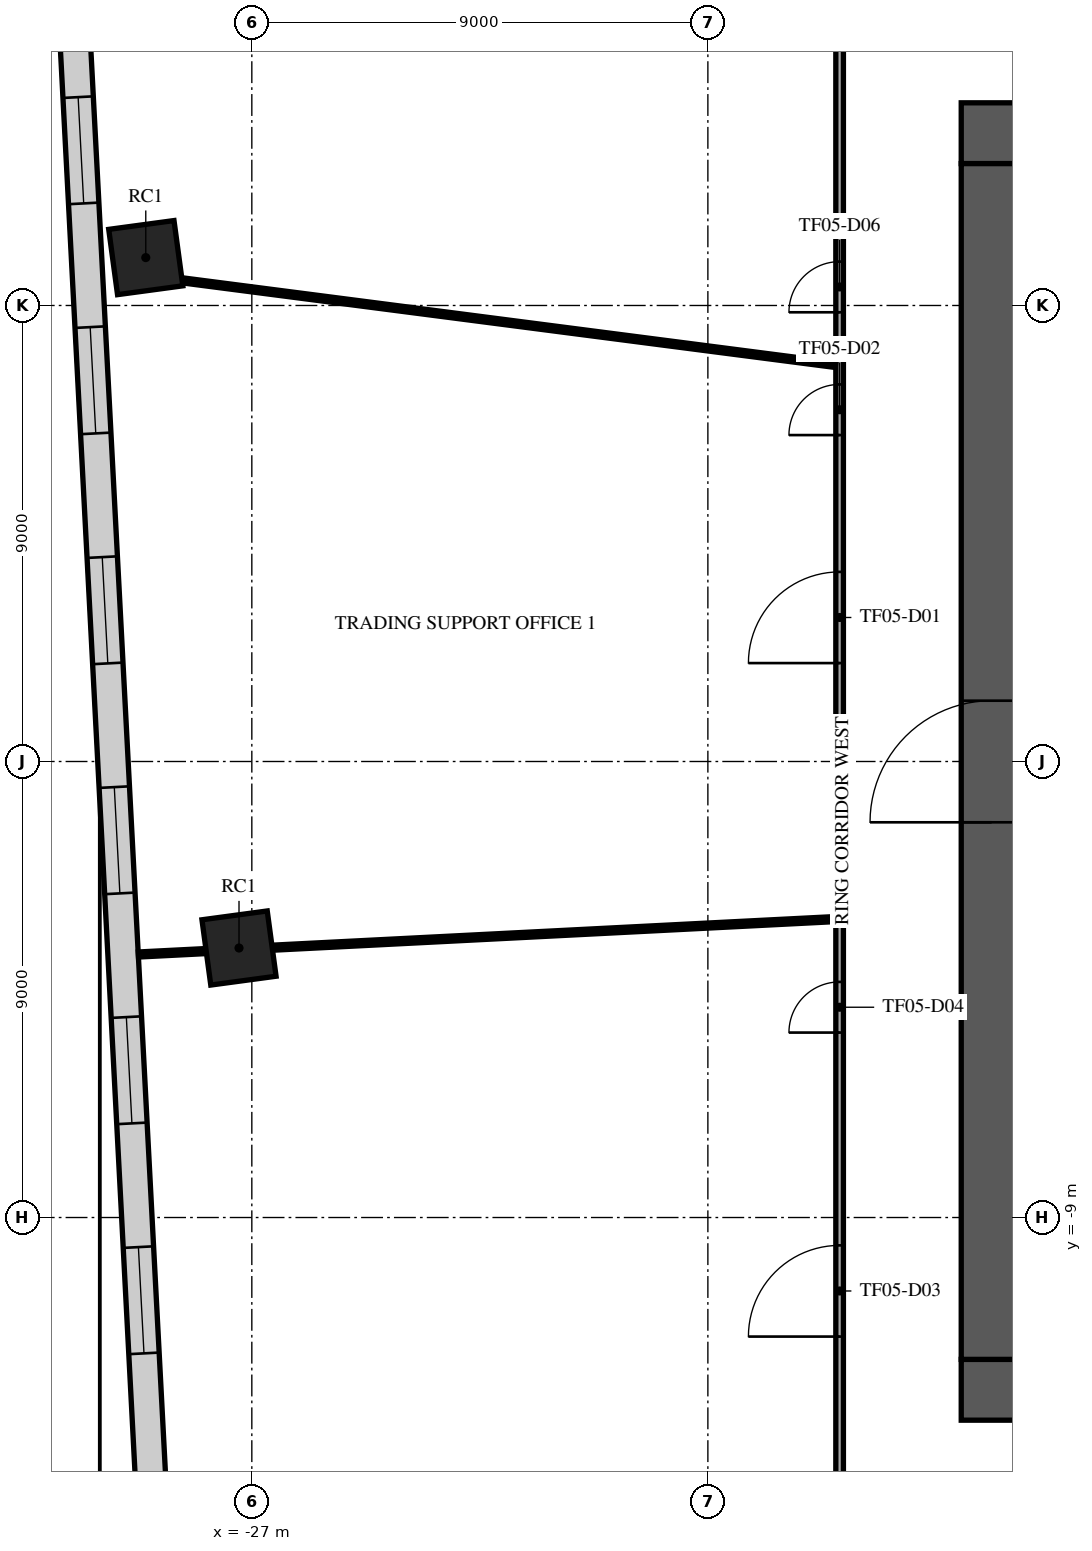
"""IFC4 building model, lengths in metres.
Left out: names, types, materials, properties, quantities, classifications, styles, units other than length and angle.
Written with IfcOpenShell. Run it as: python <this file> out.ifc"""

import sys

from ifc_helpers import new_model, si_unit, direction, frame, frame_2d, origin, origin_2d, place, context, subcontext, project, spatial, rectangle, extrude, element, fill, save


model = new_model("IFC4")
c1 = context("Model", 3, precision=1e-05, world=origin(), true_north=direction((0.0, 1.0)))
c2 = subcontext(c1, "Body", "Model", "MODEL_VIEW")
j1 = project(units=[si_unit("LENGTHUNIT", "METRE"), si_unit("PLANEANGLEUNIT", "RADIAN")], contexts=[c1])
p1 = place(None, origin())
s1 = spatial("IfcSite", under=j1, at=p1, CompositionType="ELEMENT")
p2 = place(p1, origin())
s2 = spatial("IfcBuilding", under=s1, at=p2, CompositionType="ELEMENT")
p3 = place(p2, frame((0.0, 0.0, 22.5)))
s3 = spatial("IfcBuildingStorey", under=s2, at=p3, CompositionType="ELEMENT", Elevation=22.5)
for number, where, z_axis, x_axis in (
    (1, (-29.093, 9.945, 0.0), (0.0, 0.0, 1.0), (0.991, 0.134, 0.0)),
    (2, (-27.253, -3.681, 0.0), (0.0, 0.0, 1.0), (0.991, 0.134, 0.0)),
):
    element("IfcColumn", number, at=place(p3, frame(where, z_axis=z_axis, x_axis=x_axis)), inside=s3, PredefinedType="COLUMN", context=c2, shape_type="SweptSolid", body=[
        extrude(rectangle(XDim=1.3, YDim=1.3, at=origin_2d()), origin(), (0.0, 0.0, 1.0), 4.8),
    ])
p4 = place(p3, frame((-13.0, 12.4, 0.0), z_axis=(0.0, 0.0, 1.0), x_axis=(1.0, 0.0, 0.0)))
e3 = element("IfcWall", 3, at=p4, inside=s3, PredefinedType="SHEAR", context=c2, shape_type="SweptSolid", body=[
    extrude(rectangle(XDim=26.0, YDim=1.2, at=frame_2d((13.0, 0.0))), origin(), (0.0, 0.0, 1.0), 4.35),
])
p5 = place(p4, frame((11.8, 0.0, 0.0)))
e4 = element("IfcOpeningElement", 4, at=p5, cuts=e3, PredefinedType="OPENING", context=c2, shape_type="SweptSolid", body=[
    extrude(rectangle(XDim=2.4, YDim=2.4, at=frame_2d((1.2, 1.2))), frame((0.0, 0.61, 0.0), z_axis=(0.0, -1.0, 0.0), x_axis=(1.0, 0.0, 0.0)), (0.0, 0.0, 1.0), 1.22),
])
p6 = place(p4, frame((22.625, 0.0, 0.0)))
e5 = element("IfcOpeningElement", 5, at=p6, cuts=e3, PredefinedType="OPENING", context=c2, shape_type="SweptSolid", body=[
    extrude(rectangle(XDim=1.2, YDim=2.1, at=frame_2d((0.6, 1.05))), frame((0.0, 0.61, 0.0), z_axis=(0.0, -1.0, 0.0), x_axis=(1.0, 0.0, 0.0)), (0.0, 0.0, 1.0), 1.22),
])
p7 = place(p4, frame((1.6, 0.0, 0.0)))
e6 = element("IfcOpeningElement", 6, at=p7, cuts=e3, PredefinedType="OPENING", context=c2, shape_type="SweptSolid", body=[
    extrude(rectangle(XDim=1.0, YDim=2.1, at=frame_2d((0.5, 1.05))), frame((0.0, 0.61, 0.0), z_axis=(0.0, -1.0, 0.0), x_axis=(1.0, 0.0, 0.0)), (0.0, 0.0, 1.0), 1.22),
])
p8 = place(p3, frame((-13.0, -12.4, 0.0), z_axis=(0.0, 0.0, 1.0), x_axis=(1.0, 0.0, 0.0)))
e7 = element("IfcWall", 7, at=p8, inside=s3, PredefinedType="SHEAR", context=c2, shape_type="SweptSolid", body=[
    extrude(rectangle(XDim=26.0, YDim=1.2, at=frame_2d((13.0, 0.0))), origin(), (0.0, 0.0, 1.0), 4.35),
])
p9 = place(p8, frame((7.9, 0.0, 0.0)))
e8 = element("IfcOpeningElement", 8, at=p9, cuts=e7, PredefinedType="OPENING", context=c2, shape_type="SweptSolid", body=[
    extrude(rectangle(XDim=2.0, YDim=2.1, at=frame_2d((1.0, 1.05))), frame((0.0, 0.61, 0.0), z_axis=(0.0, -1.0, 0.0), x_axis=(1.0, 0.0, 0.0)), (0.0, 0.0, 1.0), 1.22),
])
p10 = place(p8, frame((18.025, 0.0, 0.0)))
e9 = element("IfcOpeningElement", 9, at=p10, cuts=e7, PredefinedType="OPENING", context=c2, shape_type="SweptSolid", body=[
    extrude(rectangle(XDim=1.2, YDim=2.1, at=frame_2d((0.6, 1.05))), frame((0.0, 0.61, 0.0), z_axis=(0.0, -1.0, 0.0), x_axis=(1.0, 0.0, 0.0)), (0.0, 0.0, 1.0), 1.22),
])
p11 = place(p8, frame((2.175, 0.0, 0.0)))
e10 = element("IfcOpeningElement", 10, at=p11, cuts=e7, PredefinedType="OPENING", context=c2, shape_type="SweptSolid", body=[
    extrude(rectangle(XDim=1.2, YDim=2.1, at=frame_2d((0.6, 1.05))), frame((0.0, 0.61, 0.0), z_axis=(0.0, -1.0, 0.0), x_axis=(1.0, 0.0, 0.0)), (0.0, 0.0, 1.0), 1.22),
])
p12 = place(p8, frame((22.625, 0.0, 0.0)))
e11 = element("IfcOpeningElement", 11, at=p12, cuts=e7, PredefinedType="OPENING", context=c2, shape_type="SweptSolid", body=[
    extrude(rectangle(XDim=1.2, YDim=2.1, at=frame_2d((0.6, 1.05))), frame((0.0, 0.61, 0.0), z_axis=(0.0, -1.0, 0.0), x_axis=(1.0, 0.0, 0.0)), (0.0, 0.0, 1.0), 1.22),
])
p13 = place(p3, frame((-12.4, -11.8, 0.0), z_axis=(0.0, 0.0, 1.0), x_axis=(0.0, 1.0, 0.0)))
e12 = element("IfcWall", 12, at=p13, inside=s3, PredefinedType="SHEAR", context=c2, shape_type="SweptSolid", body=[
    extrude(rectangle(XDim=23.6, YDim=1.2, at=frame_2d((11.8, 0.0))), origin(), (0.0, 0.0, 1.0), 4.35),
])
p14 = place(p13, frame((10.6, 0.0, 0.0)))
e13 = element("IfcOpeningElement", 13, at=p14, cuts=e12, PredefinedType="OPENING", context=c2, shape_type="SweptSolid", body=[
    extrude(rectangle(XDim=2.4, YDim=2.4, at=frame_2d((1.2, 1.2))), frame((0.0, 0.61, 0.0), z_axis=(0.0, -1.0, 0.0), x_axis=(1.0, 0.0, 0.0)), (0.0, 0.0, 1.0), 1.22),
])
p15 = place(p3, frame((-30.961, 23.287, 0.0), z_axis=(0.0, 0.0, 1.0), x_axis=(0.052335269612, -0.998629570739, 0.0)))
e14 = element("IfcWall", 14, at=p15, inside=s3, PredefinedType="STANDARD", context=c2, shape_type="SweptSolid", body=[
    extrude(rectangle(XDim=49.751, YDim=0.6, at=frame_2d((24.876, 0.0))), origin(), (0.0, 0.0, 1.0), 4.35),
])
p16 = place(p15, frame((1.161, 0.0, 0.9)))
e15 = element("IfcOpeningElement", 15, at=p16, cuts=e14, PredefinedType="OPENING", context=c2, shape_type="SweptSolid", body=[
    extrude(rectangle(XDim=2.1, YDim=2.7, at=frame_2d((1.05, 1.35))), frame((0.0, 0.31, 0.0), z_axis=(0.0, -1.0, 0.0), x_axis=(1.0, 0.0, 0.0)), (0.0, 0.0, 1.0), 0.62),
])
p17 = place(p15, frame((5.644, 0.0, 0.9)))
e16 = element("IfcOpeningElement", 16, at=p17, cuts=e14, PredefinedType="OPENING", context=c2, shape_type="SweptSolid", body=[
    extrude(rectangle(XDim=2.1, YDim=2.7, at=frame_2d((1.05, 1.35))), frame((0.0, 0.31, 0.0), z_axis=(0.0, -1.0, 0.0), x_axis=(1.0, 0.0, 0.0)), (0.0, 0.0, 1.0), 0.62),
])
p18 = place(p15, frame((10.189, 0.0, 0.9)))
e17 = element("IfcOpeningElement", 17, at=p18, cuts=e14, PredefinedType="OPENING", context=c2, shape_type="SweptSolid", body=[
    extrude(rectangle(XDim=2.1, YDim=2.7, at=frame_2d((1.05, 1.35))), frame((0.0, 0.31, 0.0), z_axis=(0.0, -1.0, 0.0), x_axis=(1.0, 0.0, 0.0)), (0.0, 0.0, 1.0), 0.62),
])
p19 = place(p15, frame((14.735, 0.0, 0.9)))
e18 = element("IfcOpeningElement", 18, at=p19, cuts=e14, PredefinedType="OPENING", context=c2, shape_type="SweptSolid", body=[
    extrude(rectangle(XDim=2.1, YDim=2.7, at=frame_2d((1.05, 1.35))), frame((0.0, 0.31, 0.0), z_axis=(0.0, -1.0, 0.0), x_axis=(1.0, 0.0, 0.0)), (0.0, 0.0, 1.0), 0.62),
])
p20 = place(p15, frame((19.28, 0.0, 0.9)))
e19 = element("IfcOpeningElement", 19, at=p20, cuts=e14, PredefinedType="OPENING", context=c2, shape_type="SweptSolid", body=[
    extrude(rectangle(XDim=2.1, YDim=2.7, at=frame_2d((1.05, 1.35))), frame((0.0, 0.31, 0.0), z_axis=(0.0, -1.0, 0.0), x_axis=(1.0, 0.0, 0.0)), (0.0, 0.0, 1.0), 0.62),
])
p21 = place(p15, frame((23.826, 0.0, 0.9)))
e20 = element("IfcOpeningElement", 20, at=p21, cuts=e14, PredefinedType="OPENING", context=c2, shape_type="SweptSolid", body=[
    extrude(rectangle(XDim=2.1, YDim=2.7, at=frame_2d((1.05, 1.35))), frame((0.0, 0.31, 0.0), z_axis=(0.0, -1.0, 0.0), x_axis=(1.0, 0.0, 0.0)), (0.0, 0.0, 1.0), 0.62),
])
p22 = place(p15, frame((28.371, 0.0, 0.9)))
e21 = element("IfcOpeningElement", 21, at=p22, cuts=e14, PredefinedType="OPENING", context=c2, shape_type="SweptSolid", body=[
    extrude(rectangle(XDim=2.1, YDim=2.7, at=frame_2d((1.05, 1.35))), frame((0.0, 0.31, 0.0), z_axis=(0.0, -1.0, 0.0), x_axis=(1.0, 0.0, 0.0)), (0.0, 0.0, 1.0), 0.62),
])
p23 = place(p15, frame((32.917, 0.0, 0.9)))
e22 = element("IfcOpeningElement", 22, at=p23, cuts=e14, PredefinedType="OPENING", context=c2, shape_type="SweptSolid", body=[
    extrude(rectangle(XDim=2.1, YDim=2.7, at=frame_2d((1.05, 1.35))), frame((0.0, 0.31, 0.0), z_axis=(0.0, -1.0, 0.0), x_axis=(1.0, 0.0, 0.0)), (0.0, 0.0, 1.0), 0.62),
])
p24 = place(p15, frame((37.462, 0.0, 0.9)))
e23 = element("IfcOpeningElement", 23, at=p24, cuts=e14, PredefinedType="OPENING", context=c2, shape_type="SweptSolid", body=[
    extrude(rectangle(XDim=2.1, YDim=2.7, at=frame_2d((1.05, 1.35))), frame((0.0, 0.31, 0.0), z_axis=(0.0, -1.0, 0.0), x_axis=(1.0, 0.0, 0.0)), (0.0, 0.0, 1.0), 0.62),
])
p25 = place(p15, frame((42.008, 0.0, 0.9)))
e24 = element("IfcOpeningElement", 24, at=p25, cuts=e14, PredefinedType="OPENING", context=c2, shape_type="SweptSolid", body=[
    extrude(rectangle(XDim=2.1, YDim=2.7, at=frame_2d((1.05, 1.35))), frame((0.0, 0.31, 0.0), z_axis=(0.0, -1.0, 0.0), x_axis=(1.0, 0.0, 0.0)), (0.0, 0.0, 1.0), 0.62),
])
p26 = place(p15, frame((46.491, 0.0, 0.9)))
e25 = element("IfcOpeningElement", 25, at=p26, cuts=e14, PredefinedType="OPENING", context=c2, shape_type="SweptSolid", body=[
    extrude(rectangle(XDim=2.1, YDim=2.7, at=frame_2d((1.05, 1.35))), frame((0.0, 0.31, 0.0), z_axis=(0.0, -1.0, 0.0), x_axis=(1.0, 0.0, 0.0)), (0.0, 0.0, 1.0), 0.62),
])
p27 = place(p3, frame((-15.4, -15.4, 0.0), z_axis=(0.0, 0.0, 1.0), x_axis=(0.0, 1.0, 0.0)))
e26 = element("IfcWall", 26, at=p27, inside=s3, PredefinedType="PARTITIONING", context=c2, shape_type="SweptSolid", body=[
    extrude(rectangle(XDim=30.8, YDim=0.15, at=frame_2d((15.4, 0.0))), origin(), (0.0, 0.0, 1.0), 3.85),
])
p28 = place(p27, frame((17.342, 0.0, 0.0)))
e27 = element("IfcOpeningElement", 27, at=p28, cuts=e26, PredefinedType="OPENING", context=c2, shape_type="SweptSolid", body=[
    extrude(rectangle(XDim=1.8, YDim=2.1, at=frame_2d((0.9, 1.05))), frame((0.0, 0.085, 0.0), z_axis=(0.0, -1.0, 0.0), x_axis=(1.0, 0.0, 0.0)), (0.0, 0.0, 1.0), 0.17),
])
p29 = place(p27, frame((21.842, 0.0, 0.0)))
e28 = element("IfcOpeningElement", 28, at=p29, cuts=e26, PredefinedType="OPENING", context=c2, shape_type="SweptSolid", body=[
    extrude(rectangle(XDim=1.0, YDim=2.1, at=frame_2d((0.5, 1.05))), frame((0.0, 0.085, 0.0), z_axis=(0.0, -1.0, 0.0), x_axis=(1.0, 0.0, 0.0)), (0.0, 0.0, 1.0), 0.17),
])
p30 = place(p27, frame((4.05, 0.0, 0.0)))
e29 = element("IfcOpeningElement", 29, at=p30, cuts=e26, PredefinedType="OPENING", context=c2, shape_type="SweptSolid", body=[
    extrude(rectangle(XDim=1.8, YDim=2.1, at=frame_2d((0.9, 1.05))), frame((0.0, 0.085, 0.0), z_axis=(0.0, -1.0, 0.0), x_axis=(1.0, 0.0, 0.0)), (0.0, 0.0, 1.0), 0.17),
])
p31 = place(p27, frame((10.05, 0.0, 0.0)))
e30 = element("IfcOpeningElement", 30, at=p31, cuts=e26, PredefinedType="OPENING", context=c2, shape_type="SweptSolid", body=[
    extrude(rectangle(XDim=1.0, YDim=2.1, at=frame_2d((0.5, 1.05))), frame((0.0, 0.085, 0.0), z_axis=(0.0, -1.0, 0.0), x_axis=(1.0, 0.0, 0.0)), (0.0, 0.0, 1.0), 0.17),
])
p32 = place(p27, frame((24.266, 0.0, 0.0)))
e31 = element("IfcOpeningElement", 31, at=p32, cuts=e26, PredefinedType="OPENING", context=c2, shape_type="SweptSolid", body=[
    extrude(rectangle(XDim=1.0, YDim=2.1, at=frame_2d((0.5, 1.05))), frame((0.0, 0.085, 0.0), z_axis=(0.0, -1.0, 0.0), x_axis=(1.0, 0.0, 0.0)), (0.0, 0.0, 1.0), 0.17),
])
p33 = place(p3, frame((-29.239, -3.809, 0.0), z_axis=(0.0, 0.0, 1.0), x_axis=(0.998716183263, 0.050655555363, 0.0)))
e32 = element("IfcWall", 32, at=p33, inside=s3, PredefinedType="PARTITIONING", context=c2, shape_type="SweptSolid", body=[
    extrude(rectangle(XDim=1.34, YDim=0.1, at=frame_2d((0.67, 0.0))), origin(), (0.0, 0.0, 1.0), 4.35),
])
p34 = place(p3, frame((-28.377, 9.497, 0.0), z_axis=(0.0, 0.0, 1.0), x_axis=(0.991714249214, -0.128463410764, 0.0)))
e33 = element("IfcWall", 33, at=p34, inside=s3, PredefinedType="PARTITIONING", context=c2, shape_type="SweptSolid", body=[
    extrude(rectangle(XDim=13.003, YDim=0.1, at=frame_2d((6.501, 0.0))), origin(), (0.0, 0.0, 1.0), 3.85),
])
p35 = place(p3, frame((-26.598, -3.675, 0.0), z_axis=(0.0, 0.0, 1.0), x_axis=(0.998709825914, 0.050780740671, 0.0)))
e34 = element("IfcWall", 34, at=p35, inside=s3, PredefinedType="PARTITIONING", context=c2, shape_type="SweptSolid", body=[
    extrude(rectangle(XDim=11.135, YDim=0.1, at=frame_2d((5.567, 0.0))), origin(), (0.0, 0.0, 1.0), 3.85),
])
p36 = place(p14, origin())
e35 = element("IfcDoor", 35, at=p36, inside=s3, OperationType="SINGLE_SWING_LEFT", PredefinedType="DOOR", context=c2, shape_type="SweptSolid", body=[
    extrude(rectangle(XDim=2.4, YDim=2.4, at=frame_2d((1.2, 1.2))), frame((0.0, 0.025, 0.0), z_axis=(0.0, -1.0, 0.0), x_axis=(1.0, 0.0, 0.0)), (0.0, 0.0, 1.0), 0.05),
])
fill(e13, e35)
p37 = place(p18, origin())
e36 = element("IfcWindow", 36, at=p37, inside=s3, PartitioningType="SINGLE_PANEL", PredefinedType="WINDOW", context=c2, shape_type="SweptSolid", body=[
    extrude(rectangle(XDim=2.1, YDim=2.7, at=frame_2d((1.05, 1.35))), frame((0.0, 0.03, 0.0), z_axis=(0.0, -1.0, 0.0), x_axis=(1.0, 0.0, 0.0)), (0.0, 0.0, 1.0), 0.06),
])
fill(e17, e36)
p38 = place(p19, origin())
e37 = element("IfcWindow", 37, at=p38, inside=s3, PartitioningType="SINGLE_PANEL", PredefinedType="WINDOW", context=c2, shape_type="SweptSolid", body=[
    extrude(rectangle(XDim=2.1, YDim=2.7, at=frame_2d((1.05, 1.35))), frame((0.0, 0.03, 0.0), z_axis=(0.0, -1.0, 0.0), x_axis=(1.0, 0.0, 0.0)), (0.0, 0.0, 1.0), 0.06),
])
fill(e18, e37)
p39 = place(p20, origin())
e38 = element("IfcWindow", 38, at=p39, inside=s3, PartitioningType="SINGLE_PANEL", PredefinedType="WINDOW", context=c2, shape_type="SweptSolid", body=[
    extrude(rectangle(XDim=2.1, YDim=2.7, at=frame_2d((1.05, 1.35))), frame((0.0, 0.03, 0.0), z_axis=(0.0, -1.0, 0.0), x_axis=(1.0, 0.0, 0.0)), (0.0, 0.0, 1.0), 0.06),
])
fill(e19, e38)
p40 = place(p21, origin())
e39 = element("IfcWindow", 39, at=p40, inside=s3, PartitioningType="SINGLE_PANEL", PredefinedType="WINDOW", context=c2, shape_type="SweptSolid", body=[
    extrude(rectangle(XDim=2.1, YDim=2.7, at=frame_2d((1.05, 1.35))), frame((0.0, 0.03, 0.0), z_axis=(0.0, -1.0, 0.0), x_axis=(1.0, 0.0, 0.0)), (0.0, 0.0, 1.0), 0.06),
])
fill(e20, e39)
p41 = place(p22, origin())
e40 = element("IfcWindow", 40, at=p41, inside=s3, PartitioningType="SINGLE_PANEL", PredefinedType="WINDOW", context=c2, shape_type="SweptSolid", body=[
    extrude(rectangle(XDim=2.1, YDim=2.7, at=frame_2d((1.05, 1.35))), frame((0.0, 0.03, 0.0), z_axis=(0.0, -1.0, 0.0), x_axis=(1.0, 0.0, 0.0)), (0.0, 0.0, 1.0), 0.06),
])
fill(e21, e40)
p42 = place(p23, origin())
e41 = element("IfcWindow", 41, at=p42, inside=s3, PartitioningType="SINGLE_PANEL", PredefinedType="WINDOW", context=c2, shape_type="SweptSolid", body=[
    extrude(rectangle(XDim=2.1, YDim=2.7, at=frame_2d((1.05, 1.35))), frame((0.0, 0.03, 0.0), z_axis=(0.0, -1.0, 0.0), x_axis=(1.0, 0.0, 0.0)), (0.0, 0.0, 1.0), 0.06),
])
fill(e22, e41)
p43 = place(p28, origin())
e42 = element("IfcDoor", 42, at=p43, inside=s3, OperationType="DOUBLE_DOOR_SINGLE_SWING", PredefinedType="DOOR", context=c2, shape_type="SweptSolid", body=[
    extrude(rectangle(XDim=1.8, YDim=2.1, at=frame_2d((0.9, 1.05))), frame((0.0, 0.025, 0.0), z_axis=(0.0, -1.0, 0.0), x_axis=(1.0, 0.0, 0.0)), (0.0, 0.0, 1.0), 0.05),
])
fill(e27, e42)
p44 = place(p29, origin())
e43 = element("IfcDoor", 43, at=p44, inside=s3, OperationType="SINGLE_SWING_RIGHT", PredefinedType="DOOR", context=c2, shape_type="SweptSolid", body=[
    extrude(rectangle(XDim=1.0, YDim=2.1, at=frame_2d((0.5, 1.05))), frame((0.0, 0.025, 0.0), z_axis=(0.0, -1.0, 0.0), x_axis=(1.0, 0.0, 0.0)), (0.0, 0.0, 1.0), 0.05),
])
fill(e28, e43)
p45 = place(p30, origin())
e44 = element("IfcDoor", 44, at=p45, inside=s3, OperationType="DOUBLE_DOOR_SINGLE_SWING", PredefinedType="DOOR", context=c2, shape_type="SweptSolid", body=[
    extrude(rectangle(XDim=1.8, YDim=2.1, at=frame_2d((0.9, 1.05))), frame((0.0, 0.025, 0.0), z_axis=(0.0, -1.0, 0.0), x_axis=(1.0, 0.0, 0.0)), (0.0, 0.0, 1.0), 0.05),
])
fill(e29, e44)
p46 = place(p31, origin())
e45 = element("IfcDoor", 45, at=p46, inside=s3, OperationType="SINGLE_SWING_RIGHT", PredefinedType="DOOR", context=c2, shape_type="SweptSolid", body=[
    extrude(rectangle(XDim=1.0, YDim=2.1, at=frame_2d((0.5, 1.05))), frame((0.0, 0.025, 0.0), z_axis=(0.0, -1.0, 0.0), x_axis=(1.0, 0.0, 0.0)), (0.0, 0.0, 1.0), 0.05),
])
fill(e30, e45)
p47 = place(p32, origin())
e46 = element("IfcDoor", 46, at=p47, inside=s3, OperationType="SINGLE_SWING_LEFT", PredefinedType="DOOR", context=c2, shape_type="SweptSolid", body=[
    extrude(rectangle(XDim=1.0, YDim=2.1, at=frame_2d((0.5, 1.05))), frame((0.0, 0.025, 0.0), z_axis=(0.0, -1.0, 0.0), x_axis=(1.0, 0.0, 0.0)), (0.0, 0.0, 1.0), 0.05),
])
fill(e31, e46)
save(model, sys.argv[1])
